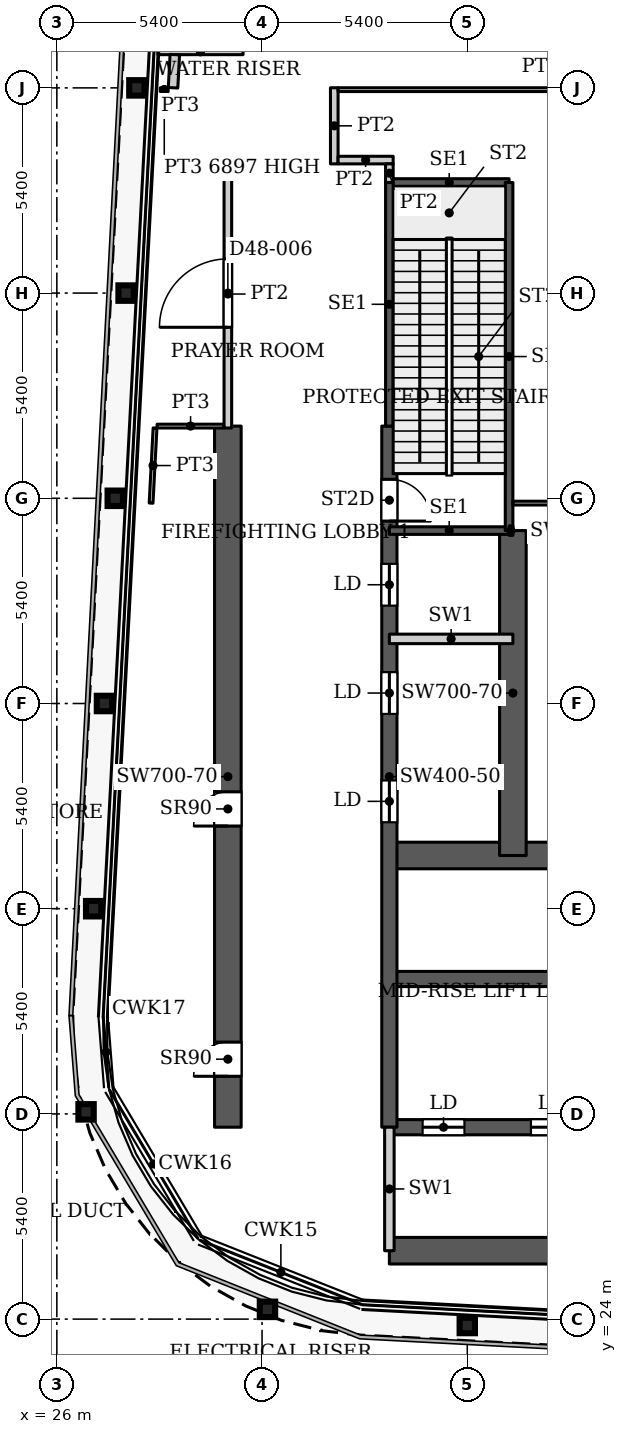
"""IFC4 building model, lengths in metres.
Left out: names, types, materials, properties, quantities, classifications, styles, units other than length and angle.
Written with IfcOpenShell. Run it as: python <this file> out.ifc"""

import sys

from ifc_helpers import new_model, si_unit, direction, frame, frame_2d, origin, origin_2d, place, context, subcontext, project, spatial, rectangle, i_section, extrude, source, transform, mapped, element, fill, save


model = new_model("IFC4")
c1 = context("Model", 3, precision=1e-05, world=origin(), true_north=direction((0.0, 1.0)))
c2 = subcontext(c1, "Body", "Model", "MODEL_VIEW")
j1 = project(units=[si_unit("LENGTHUNIT", "METRE"), si_unit("PLANEANGLEUNIT", "RADIAN")], contexts=[c1])
p1 = place(None, origin())
s1 = spatial("IfcSite", under=j1, at=p1, CompositionType="ELEMENT")
p2 = place(p1, origin())
s2 = spatial("IfcBuilding", under=s1, at=p2, CompositionType="ELEMENT")
p3 = place(p2, frame((0.0, 0.0, 203.3)))
s3 = spatial("IfcBuildingStorey", under=s2, at=p3, CompositionType="ELEMENT", Elevation=203.3)
for number, where, z_axis, x_axis in (
    (1, (36.8, 23.832, 0.0), (0.0, 0.0, 1.0), (1.0, 0.0, 0.0)),
    (2, (31.542, 24.257, 0.0), (0.0, 0.0, 1.0), (1.0, 0.0, 0.0)),
    (3, (26.769, 29.454, 0.0), (0.0, 0.0, 1.0), (1.0, 0.0, 0.0)),
    (4, (26.969, 34.8, 0.0), (0.0, 0.0, 1.0), (1.0, 0.0, 0.0)),
    (5, (27.253, 40.2, 0.0), (0.0, 0.0, 1.0), (1.0, 0.0, 0.0)),
    (6, (27.537, 45.6, 0.0), (0.0, 0.0, 1.0), (1.0, 0.0, 0.0)),
    (7, (27.822, 51.0, 0.0), (0.0, 0.0, 1.0), (1.0, 0.0, 0.0)),
    (8, (28.106, 56.4, 0.0), (0.0, 0.0, 1.0), (1.0, 0.0, 0.0)),
):
    element("IfcColumn", number, at=place(p3, frame(where, z_axis=z_axis, x_axis=x_axis)), inside=s3, PredefinedType="COLUMN", context=c2, shape_type="SweptSolid", body=[
        extrude(i_section(OverallWidth=0.404, OverallDepth=0.407, WebThickness=0.027, FlangeThickness=0.044, FilletRadius=0.012, at=origin_2d()), origin(), (0.0, 0.0, 1.0), 7.8),
    ])
p4 = place(p3, frame((34.75, 25.8, 0.0), z_axis=(0.0, 0.0, 1.0), x_axis=(1.0, 0.0, 0.0)))
e9 = element("IfcWall", 9, at=p4, inside=s3, PredefinedType="SHEAR", context=c2, shape_type="SweptSolid", body=[
    extrude(rectangle(XDim=18.4, YDim=0.7, at=frame_2d((9.2, 0.0))), origin(), (0.0, 0.0, 1.0), 7.8),
])
p5 = place(p3, frame((34.75, 29.05, 0.0), z_axis=(0.0, 0.0, 1.0), x_axis=(1.0, 0.0, 0.0)))
e10 = element("IfcWall", 10, at=p5, inside=s3, PredefinedType="SHEAR", context=c2, shape_type="SweptSolid", body=[
    extrude(rectangle(XDim=18.4, YDim=0.4, at=frame_2d((9.2, 0.0))), origin(), (0.0, 0.0, 1.0), 7.8),
])
p6 = place(p5, frame((0.875, 0.0, 0.0)))
e11 = element("IfcOpeningElement", 11, at=p6, cuts=e10, PredefinedType="OPENING", context=c2, shape_type="SweptSolid", body=[
    extrude(rectangle(XDim=1.1, YDim=2.2, at=frame_2d((0.55, 1.1))), frame((0.0, 0.21, 0.0), z_axis=(0.0, -1.0, 0.0), x_axis=(1.0, 0.0, 0.0)), (0.0, 0.0, 1.0), 0.42),
])
p7 = place(p5, frame((3.725, 0.0, 0.0)))
e12 = element("IfcOpeningElement", 12, at=p7, cuts=e10, PredefinedType="OPENING", context=c2, shape_type="SweptSolid", body=[
    extrude(rectangle(XDim=1.1, YDim=2.2, at=frame_2d((0.55, 1.1))), frame((0.0, 0.21, 0.0), z_axis=(0.0, -1.0, 0.0), x_axis=(1.0, 0.0, 0.0)), (0.0, 0.0, 1.0), 0.42),
])
p8 = place(p5, frame((6.575, 0.0, 0.0)))
e13 = element("IfcOpeningElement", 13, at=p8, cuts=e10, PredefinedType="OPENING", context=c2, shape_type="SweptSolid", body=[
    extrude(rectangle(XDim=1.1, YDim=2.2, at=frame_2d((0.55, 1.1))), frame((0.0, 0.21, 0.0), z_axis=(0.0, -1.0, 0.0), x_axis=(1.0, 0.0, 0.0)), (0.0, 0.0, 1.0), 0.42),
])
p9 = place(p5, frame((9.425, 0.0, 0.0)))
e14 = element("IfcOpeningElement", 14, at=p9, cuts=e10, PredefinedType="OPENING", context=c2, shape_type="SweptSolid", body=[
    extrude(rectangle(XDim=1.1, YDim=2.2, at=frame_2d((0.55, 1.1))), frame((0.0, 0.21, 0.0), z_axis=(0.0, -1.0, 0.0), x_axis=(1.0, 0.0, 0.0)), (0.0, 0.0, 1.0), 0.42),
])
p10 = place(p5, frame((12.275, 0.0, 0.0)))
e15 = element("IfcOpeningElement", 15, at=p10, cuts=e10, PredefinedType="OPENING", context=c2, shape_type="SweptSolid", body=[
    extrude(rectangle(XDim=1.1, YDim=2.2, at=frame_2d((0.55, 1.1))), frame((0.0, 0.21, 0.0), z_axis=(0.0, -1.0, 0.0), x_axis=(1.0, 0.0, 0.0)), (0.0, 0.0, 1.0), 0.42),
])
p11 = place(p5, frame((15.125, 0.0, 0.0)))
e16 = element("IfcOpeningElement", 16, at=p11, cuts=e10, PredefinedType="OPENING", context=c2, shape_type="SweptSolid", body=[
    extrude(rectangle(XDim=1.1, YDim=2.2, at=frame_2d((0.55, 1.1))), frame((0.0, 0.21, 0.0), z_axis=(0.0, -1.0, 0.0), x_axis=(1.0, 0.0, 0.0)), (0.0, 0.0, 1.0), 0.42),
])
p12 = place(p3, frame((34.75, 32.95, 0.0), z_axis=(0.0, 0.0, 1.0), x_axis=(1.0, 0.0, 0.0)))
e17 = element("IfcWall", 17, at=p12, inside=s3, PredefinedType="SHEAR", context=c2, shape_type="SweptSolid", body=[
    extrude(rectangle(XDim=14.25, YDim=0.4, at=frame_2d((7.125, 0.0))), origin(), (0.0, 0.0, 1.0), 7.8),
])
p13 = place(p3, frame((34.75, 36.2, 0.0), z_axis=(0.0, 0.0, 1.0), x_axis=(1.0, 0.0, 0.0)))
e18 = element("IfcWall", 18, at=p13, inside=s3, PredefinedType="SHEAR", context=c2, shape_type="SweptSolid", body=[
    extrude(rectangle(XDim=18.4, YDim=0.7, at=frame_2d((9.2, 0.0))), origin(), (0.0, 0.0, 1.0), 7.8),
])
p14 = place(p13, frame((16.9, 0.0, 0.0)))
e19 = element("IfcOpeningElement", 19, at=p14, cuts=e18, PredefinedType="OPENING", context=c2, shape_type="SweptSolid", body=[
    extrude(rectangle(XDim=1.0, YDim=2.2, at=frame_2d((0.5, 1.1))), frame((0.0, 0.36, 0.0), z_axis=(0.0, -1.0, 0.0), x_axis=(1.0, 0.0, 0.0)), (0.0, 0.0, 1.0), 0.72),
])
p15 = place(p3, frame((34.75, 29.05, 0.0), z_axis=(0.0, 0.0, 1.0), x_axis=(0.0, 1.0, 0.0)))
e20 = element("IfcWall", 20, at=p15, inside=s3, PredefinedType="SHEAR", context=c2, shape_type="SweptSolid", body=[
    extrude(rectangle(XDim=18.45, YDim=0.4, at=frame_2d((9.225, 0.0))), origin(), (0.0, 0.0, 1.0), 7.8),
])
p16 = place(p15, frame((8.025, 0.0, 0.0)))
e21 = element("IfcOpeningElement", 21, at=p16, cuts=e20, PredefinedType="OPENING", context=c2, shape_type="SweptSolid", body=[
    extrude(rectangle(XDim=1.1, YDim=2.2, at=frame_2d((0.55, 1.1))), frame((0.0, 0.21, 0.0), z_axis=(0.0, -1.0, 0.0), x_axis=(1.0, 0.0, 0.0)), (0.0, 0.0, 1.0), 0.42),
])
p17 = place(p15, frame((10.875, 0.0, 0.0)))
e22 = element("IfcOpeningElement", 22, at=p17, cuts=e20, PredefinedType="OPENING", context=c2, shape_type="SweptSolid", body=[
    extrude(rectangle(XDim=1.1, YDim=2.2, at=frame_2d((0.55, 1.1))), frame((0.0, 0.21, 0.0), z_axis=(0.0, -1.0, 0.0), x_axis=(1.0, 0.0, 0.0)), (0.0, 0.0, 1.0), 0.42),
])
p18 = place(p15, frame((13.725, 0.0, 0.0)))
e23 = element("IfcOpeningElement", 23, at=p18, cuts=e20, PredefinedType="OPENING", context=c2, shape_type="SweptSolid", body=[
    extrude(rectangle(XDim=1.1, YDim=2.2, at=frame_2d((0.55, 1.1))), frame((0.0, 0.21, 0.0), z_axis=(0.0, -1.0, 0.0), x_axis=(1.0, 0.0, 0.0)), (0.0, 0.0, 1.0), 0.42),
])
p19 = place(p15, frame((15.95, 0.0, 0.0)))
e24 = element("IfcOpeningElement", 24, at=p19, cuts=e20, PredefinedType="OPENING", context=c2, shape_type="SweptSolid", body=[
    extrude(rectangle(XDim=1.1, YDim=2.2, at=frame_2d((0.55, 1.1))), frame((0.0, 0.21, 0.0), z_axis=(0.0, -1.0, 0.0), x_axis=(1.0, 0.0, 0.0)), (0.0, 0.0, 1.0), 0.42),
])
p20 = place(p3, frame((38.0, 36.2, 0.0), z_axis=(0.0, 0.0, 1.0), x_axis=(0.0, 1.0, 0.0)))
e25 = element("IfcWall", 25, at=p20, inside=s3, PredefinedType="SHEAR", context=c2, shape_type="SweptSolid", body=[
    extrude(rectangle(XDim=8.55, YDim=0.7, at=frame_2d((4.275, 0.0))), origin(), (0.0, 0.0, 1.0), 7.8),
])
p21 = place(p3, frame((30.5, 29.05, 0.0), z_axis=(0.0, 0.0, 1.0), x_axis=(0.0, 1.0, 0.0)))
e26 = element("IfcWall", 26, at=p21, inside=s3, PredefinedType="SHEAR", context=c2, shape_type="SweptSolid", body=[
    extrude(rectangle(XDim=18.45, YDim=0.7, at=frame_2d((9.225, 0.0))), origin(), (0.0, 0.0, 1.0), 7.8),
])
p22 = place(p21, frame((1.34, 0.0, 0.0)))
e27 = element("IfcOpeningElement", 27, at=p22, cuts=e26, PredefinedType="OPENING", context=c2, shape_type="SweptSolid", body=[
    extrude(rectangle(XDim=0.9, YDim=2.2, at=frame_2d((0.45, 1.1))), frame((0.0, 0.36, 0.0), z_axis=(0.0, -1.0, 0.0), x_axis=(1.0, 0.0, 0.0)), (0.0, 0.0, 1.0), 0.72),
])
p23 = place(p21, frame((7.925, 0.0, 0.0)))
e28 = element("IfcOpeningElement", 28, at=p23, cuts=e26, PredefinedType="OPENING", context=c2, shape_type="SweptSolid", body=[
    extrude(rectangle(XDim=0.9, YDim=2.2, at=frame_2d((0.45, 1.1))), frame((0.0, 0.36, 0.0), z_axis=(0.0, -1.0, 0.0), x_axis=(1.0, 0.0, 0.0)), (0.0, 0.0, 1.0), 0.72),
])
for number, where, z_axis, x_axis in (
    (29, (34.75, 44.75, 0.0), (0.0, 0.0, 1.0), (1.0, 0.0, 0.0)),
    (30, (34.75, 53.91, 0.0), (0.0, 0.0, 1.0), (1.0, 0.0, 0.0)),
):
    element("IfcWall", number, at=place(p3, frame(where, z_axis=z_axis, x_axis=x_axis)), inside=s3, PredefinedType="SHEAR", context=c2, shape_type="SweptSolid", body=[
        extrude(rectangle(XDim=3.15, YDim=0.2, at=frame_2d((1.575, 0.0))), origin(), (0.0, 0.0, 1.0), 7.8),
    ])
p24 = place(p3, frame((34.75, 47.5, 0.0), z_axis=(0.0, 0.0, 1.0), x_axis=(0.0, 1.0, 0.0)))
e31 = element("IfcWall", 31, at=p24, inside=s3, PredefinedType="SHEAR", context=c2, shape_type="SweptSolid", body=[
    extrude(rectangle(XDim=6.41, YDim=0.2, at=frame_2d((3.205, 0.0))), origin(), (0.0, 0.0, 1.0), 7.8),
])
p25 = place(p3, frame((37.9, 44.75, 0.0), z_axis=(0.0, 0.0, 1.0), x_axis=(0.0, 1.0, 0.0)))
e32 = element("IfcWall", 32, at=p25, inside=s3, PredefinedType="SHEAR", context=c2, shape_type="SweptSolid", body=[
    extrude(rectangle(XDim=9.16, YDim=0.2, at=frame_2d((4.58, 0.0))), origin(), (0.0, 0.0, 1.0), 7.8),
])
for number, where, z_axis, x_axis in (
    (33, (34.75, 25.8, 0.0), (0.0, 0.0, 1.0), (0.0, 1.0, 0.0)),
    (34, (34.75, 41.9, 0.0), (0.0, 0.0, 1.0), (1.0, 0.0, 0.0)),
):
    element("IfcWall", number, at=place(p3, frame(where, z_axis=z_axis, x_axis=x_axis)), inside=s3, PredefinedType="PARTITIONING", context=c2, shape_type="SweptSolid", body=[
        extrude(rectangle(XDim=3.25, YDim=0.25, at=frame_2d((1.625, 0.0))), origin(), (0.0, 0.0, 1.0), 7.8),
    ])
p26 = place(p3, frame((37.9, 44.75, 0.0), z_axis=(0.0, 0.0, 1.0), x_axis=(1.0, 0.0, 0.0)))
e35 = element("IfcWall", 35, at=p26, inside=s3, PredefinedType="PARTITIONING", context=c2, shape_type="SweptSolid", body=[
    extrude(rectangle(XDim=0.1, YDim=0.25, at=frame_2d((0.05, 0.0))), origin(), (0.0, 0.0, 1.0), 7.8),
])
p27 = place(p3, frame((28.658, 57.349, 0.0), z_axis=(0.0, 0.0, 1.0), x_axis=(1.0, 0.0, 0.0)))
e36 = element("IfcWall", 36, at=p27, inside=s3, PredefinedType="PARTITIONING", context=c2, shape_type="SweptSolid", body=[
    extrude(rectangle(XDim=2.242, YDim=0.15, at=frame_2d((1.121, 0.0))), origin(), (0.0, 0.0, 1.0), 7.8),
])
p28 = place(p3, frame((28.48, 45.473, 0.0), z_axis=(0.0, 0.0, 1.0), x_axis=(0.052532943397, 0.998619191613, 0.0)))
e37 = element("IfcWall", 37, at=p28, inside=s3, PredefinedType="PARTITIONING", context=c2, shape_type="SweptSolid", body=[
    extrude(rectangle(XDim=1.98, YDim=0.1, at=frame_2d((0.99, 0.0))), origin(), (0.0, 0.0, 1.0), 7.5),
])
p29 = place(p3, frame((28.638, 47.5, 0.0), z_axis=(0.0, 0.0, 1.0), x_axis=(1.0, 0.0, 0.0)))
e38 = element("IfcWall", 38, at=p29, inside=s3, PredefinedType="PARTITIONING", context=c2, shape_type="SweptSolid", body=[
    extrude(rectangle(XDim=1.762, YDim=0.1, at=frame_2d((0.881, 0.0))), origin(), (0.0, 0.0, 1.0), 7.5),
])
p30 = place(p3, frame((28.724, 56.353, 0.0), z_axis=(0.0, 0.0, 1.0), x_axis=(1.0, 0.0, 0.0)))
e39 = element("IfcWall", 39, at=p30, inside=s3, PredefinedType="PARTITIONING", context=c2, shape_type="SweptSolid", body=[
    extrude(rectangle(XDim=0.205, YDim=0.1, at=frame_2d((0.103, 0.0))), origin(), (0.0, 0.0, 1.0), 6.897),
])
p31 = place(p3, frame((29.058, 56.403, 0.0), z_axis=(0.0, 0.0, 1.0), x_axis=(0.052573510687, 0.998617056721, 0.0)))
e40 = element("IfcWall", 40, at=p31, inside=s3, PredefinedType="PARTITIONING", context=c2, shape_type="SweptSolid", body=[
    extrude(rectangle(XDim=0.873, YDim=0.25, at=frame_2d((0.437, 0.0))), origin(), (0.0, 0.0, 1.0), 7.5),
])
p32 = place(p3, frame((30.5, 47.45, 0.0), z_axis=(0.0, 0.0, 1.0), x_axis=(0.0, 1.0, 0.0)))
e41 = element("IfcWall", 41, at=p32, inside=s3, PredefinedType="PARTITIONING", context=c2, shape_type="SweptSolid", body=[
    extrude(rectangle(XDim=7.05, YDim=0.2, at=frame_2d((3.525, 0.0))), origin(), (0.0, 0.0, 1.0), 7.5),
])
p33 = place(p32, frame((2.65, 0.0, 0.0)))
e42 = element("IfcOpeningElement", 42, at=p33, cuts=e41, PredefinedType="OPENING", context=c2, shape_type="SweptSolid", body=[
    extrude(rectangle(XDim=1.8, YDim=2.1, at=frame_2d((0.9, 1.05))), frame((0.0, 0.11, 0.0), z_axis=(0.0, -1.0, 0.0), x_axis=(1.0, 0.0, 0.0)), (0.0, 0.0, 1.0), 0.22),
])
p34 = place(p3, frame((33.3, 54.4, 0.0), z_axis=(0.0, 0.0, 1.0), x_axis=(0.0, 1.0, 0.0)))
e43 = element("IfcWall", 43, at=p34, inside=s3, PredefinedType="PARTITIONING", context=c2, shape_type="SweptSolid", body=[
    extrude(rectangle(XDim=2.003, YDim=0.2, at=frame_2d((1.001, 0.0))), origin(), (0.0, 0.0, 1.0), 7.5),
])
p35 = place(p3, frame((33.4, 54.5, 0.0), z_axis=(0.0, 0.0, 1.0), x_axis=(1.0, 0.0, 0.0)))
e44 = element("IfcWall", 44, at=p35, inside=s3, PredefinedType="PARTITIONING", context=c2, shape_type="SweptSolid", body=[
    extrude(rectangle(XDim=1.45, YDim=0.2, at=frame_2d((0.725, 0.0))), origin(), (0.0, 0.0, 1.0), 7.5),
])
p36 = place(p3, frame((33.4, 56.353, 0.0), z_axis=(0.0, 0.0, 1.0), x_axis=(1.0, 0.0, 0.0)))
e45 = element("IfcWall", 45, at=p36, inside=s3, PredefinedType="PARTITIONING", context=c2, shape_type="SweptSolid", body=[
    extrude(rectangle(XDim=13.77, YDim=0.1, at=frame_2d((6.885, 0.0))), origin(), (0.0, 0.0, 1.0), 6.897),
])
p37 = place(p36, frame((5.55, 0.0, 0.0)))
e46 = element("IfcOpeningElement", 46, at=p37, cuts=e45, PredefinedType="OPENING", context=c2, shape_type="SweptSolid", body=[
    extrude(rectangle(XDim=1.0, YDim=2.1, at=frame_2d((0.5, 1.05))), frame((0.0, 0.06, 0.0), z_axis=(0.0, -1.0, 0.0), x_axis=(1.0, 0.0, 0.0)), (0.0, 0.0, 1.0), 0.12),
])
p38 = place(p3, frame((34.75, 53.91, 0.0), z_axis=(0.0, 0.0, 1.0), x_axis=(0.0, 1.0, 0.0)))
e47 = element("IfcWall", 47, at=p38, inside=s3, PredefinedType="PARTITIONING", context=c2, shape_type="SweptSolid", body=[
    extrude(rectangle(XDim=0.49, YDim=0.2, at=frame_2d((0.245, 0.0))), origin(), (0.0, 0.0, 1.0), 7.5),
])
p39 = place(p3, frame((37.999, 45.473, 0.0), z_axis=(0.0, 0.0, 1.0), x_axis=(1.0, 0.0, 0.0)))
e48 = element("IfcWall", 48, at=p39, inside=s3, PredefinedType="PARTITIONING", context=c2, shape_type="SweptSolid", body=[
    extrude(rectangle(XDim=9.941, YDim=0.1, at=frame_2d((4.97, 0.0))), origin(), (0.0, 0.0, 1.0), 7.5),
])
m1 = source(origin(), c2, "Body", "SweptSolid", [
    extrude(rectangle(XDim=1.1, YDim=2.2, at=frame_2d((0.55, 1.1))), frame((0.0, 0.025, 0.0), z_axis=(0.0, -1.0, 0.0), x_axis=(1.0, 0.0, 0.0)), (0.0, 0.0, 1.0), 0.05),
])
p40 = place(p6, origin())
e49 = element("IfcDoor", 49, at=p40, inside=s3, OperationType="SLIDING_TO_LEFT", PredefinedType="DOOR", context=c2, shape_type="MappedRepresentation", body=[
    mapped(m1, transform((0.0, 0.0, 0.0), x_axis=(1.0, 0.0, 0.0), y_axis=(0.0, 1.0, 0.0), z_axis=(0.0, 0.0, 1.0), scale=1.0)),
])
fill(e11, e49)
p41 = place(p7, origin())
e50 = element("IfcDoor", 50, at=p41, inside=s3, OperationType="SLIDING_TO_LEFT", PredefinedType="DOOR", context=c2, shape_type="MappedRepresentation", body=[
    mapped(m1, transform((0.0, 0.0, 0.0), x_axis=(1.0, 0.0, 0.0), y_axis=(0.0, 1.0, 0.0), z_axis=(0.0, 0.0, 1.0), scale=1.0)),
])
fill(e12, e50)
p42 = place(p16, origin())
e51 = element("IfcDoor", 51, at=p42, inside=s3, OperationType="SLIDING_TO_LEFT", PredefinedType="DOOR", context=c2, shape_type="MappedRepresentation", body=[
    mapped(m1, transform((0.0, 0.0, 0.0), x_axis=(1.0, 0.0, 0.0), y_axis=(0.0, 1.0, 0.0), z_axis=(0.0, 0.0, 1.0), scale=1.0)),
])
fill(e21, e51)
p43 = place(p17, origin())
e52 = element("IfcDoor", 52, at=p43, inside=s3, OperationType="SLIDING_TO_LEFT", PredefinedType="DOOR", context=c2, shape_type="MappedRepresentation", body=[
    mapped(m1, transform((0.0, 0.0, 0.0), x_axis=(1.0, 0.0, 0.0), y_axis=(0.0, 1.0, 0.0), z_axis=(0.0, 0.0, 1.0), scale=1.0)),
])
fill(e22, e52)
p44 = place(p18, origin())
e53 = element("IfcDoor", 53, at=p44, inside=s3, OperationType="SLIDING_TO_LEFT", PredefinedType="DOOR", context=c2, shape_type="MappedRepresentation", body=[
    mapped(m1, transform((0.0, 0.0, 0.0), x_axis=(1.0, 0.0, 0.0), y_axis=(0.0, 1.0, 0.0), z_axis=(0.0, 0.0, 1.0), scale=1.0)),
])
fill(e23, e53)
m2 = source(origin(), c2, "Body", "SweptSolid", [
    extrude(rectangle(XDim=0.9, YDim=2.2, at=frame_2d((0.45, 1.1))), frame((0.0, 0.025, 0.0), z_axis=(0.0, -1.0, 0.0), x_axis=(1.0, 0.0, 0.0)), (0.0, 0.0, 1.0), 0.05),
])
p45 = place(p22, origin())
e54 = element("IfcDoor", 54, at=p45, inside=s3, OperationType="SINGLE_SWING_LEFT", PredefinedType="DOOR", context=c2, shape_type="MappedRepresentation", body=[
    mapped(m2, transform((0.0, 0.0, 0.0), x_axis=(1.0, 0.0, 0.0), y_axis=(0.0, 1.0, 0.0), z_axis=(0.0, 0.0, 1.0), scale=1.0)),
])
fill(e27, e54)
p46 = place(p23, origin())
e55 = element("IfcDoor", 55, at=p46, inside=s3, OperationType="SINGLE_SWING_LEFT", PredefinedType="DOOR", context=c2, shape_type="MappedRepresentation", body=[
    mapped(m2, transform((0.0, 0.0, 0.0), x_axis=(1.0, 0.0, 0.0), y_axis=(0.0, 1.0, 0.0), z_axis=(0.0, 0.0, 1.0), scale=1.0)),
])
fill(e28, e55)
m3 = source(origin(), c2, "Body", "SweptSolid", [
    extrude(rectangle(XDim=1.1, YDim=2.2, at=frame_2d((0.55, 1.1))), frame((0.0, 0.025, 0.0), z_axis=(0.0, -1.0, 0.0), x_axis=(1.0, 0.0, 0.0)), (0.0, 0.0, 1.0), 0.05),
])
p47 = place(p19, origin())
e56 = element("IfcDoor", 56, at=p47, inside=s3, OperationType="SINGLE_SWING_RIGHT", PredefinedType="DOOR", context=c2, shape_type="MappedRepresentation", body=[
    mapped(m3, transform((0.0, 0.0, 0.0), x_axis=(1.0, 0.0, 0.0), y_axis=(0.0, 1.0, 0.0), z_axis=(0.0, 0.0, 1.0), scale=1.0)),
])
fill(e24, e56)
m4 = source(origin(), c2, "Body", "SweptSolid", [
    extrude(rectangle(XDim=1.8, YDim=2.1, at=frame_2d((0.9, 1.05))), frame((0.0, 0.025, 0.0), z_axis=(0.0, -1.0, 0.0), x_axis=(1.0, 0.0, 0.0)), (0.0, 0.0, 1.0), 0.05),
])
p48 = place(p33, origin())
e57 = element("IfcDoor", 57, at=p48, inside=s3, OperationType="DOUBLE_DOOR_SINGLE_SWING", PredefinedType="DOOR", context=c2, shape_type="MappedRepresentation", body=[
    mapped(m4, transform((0.0, 0.0, 0.0), x_axis=(1.0, 0.0, 0.0), y_axis=(0.0, 1.0, 0.0), z_axis=(0.0, 0.0, 1.0), scale=1.0)),
])
fill(e42, e57)
save(model, sys.argv[1])
